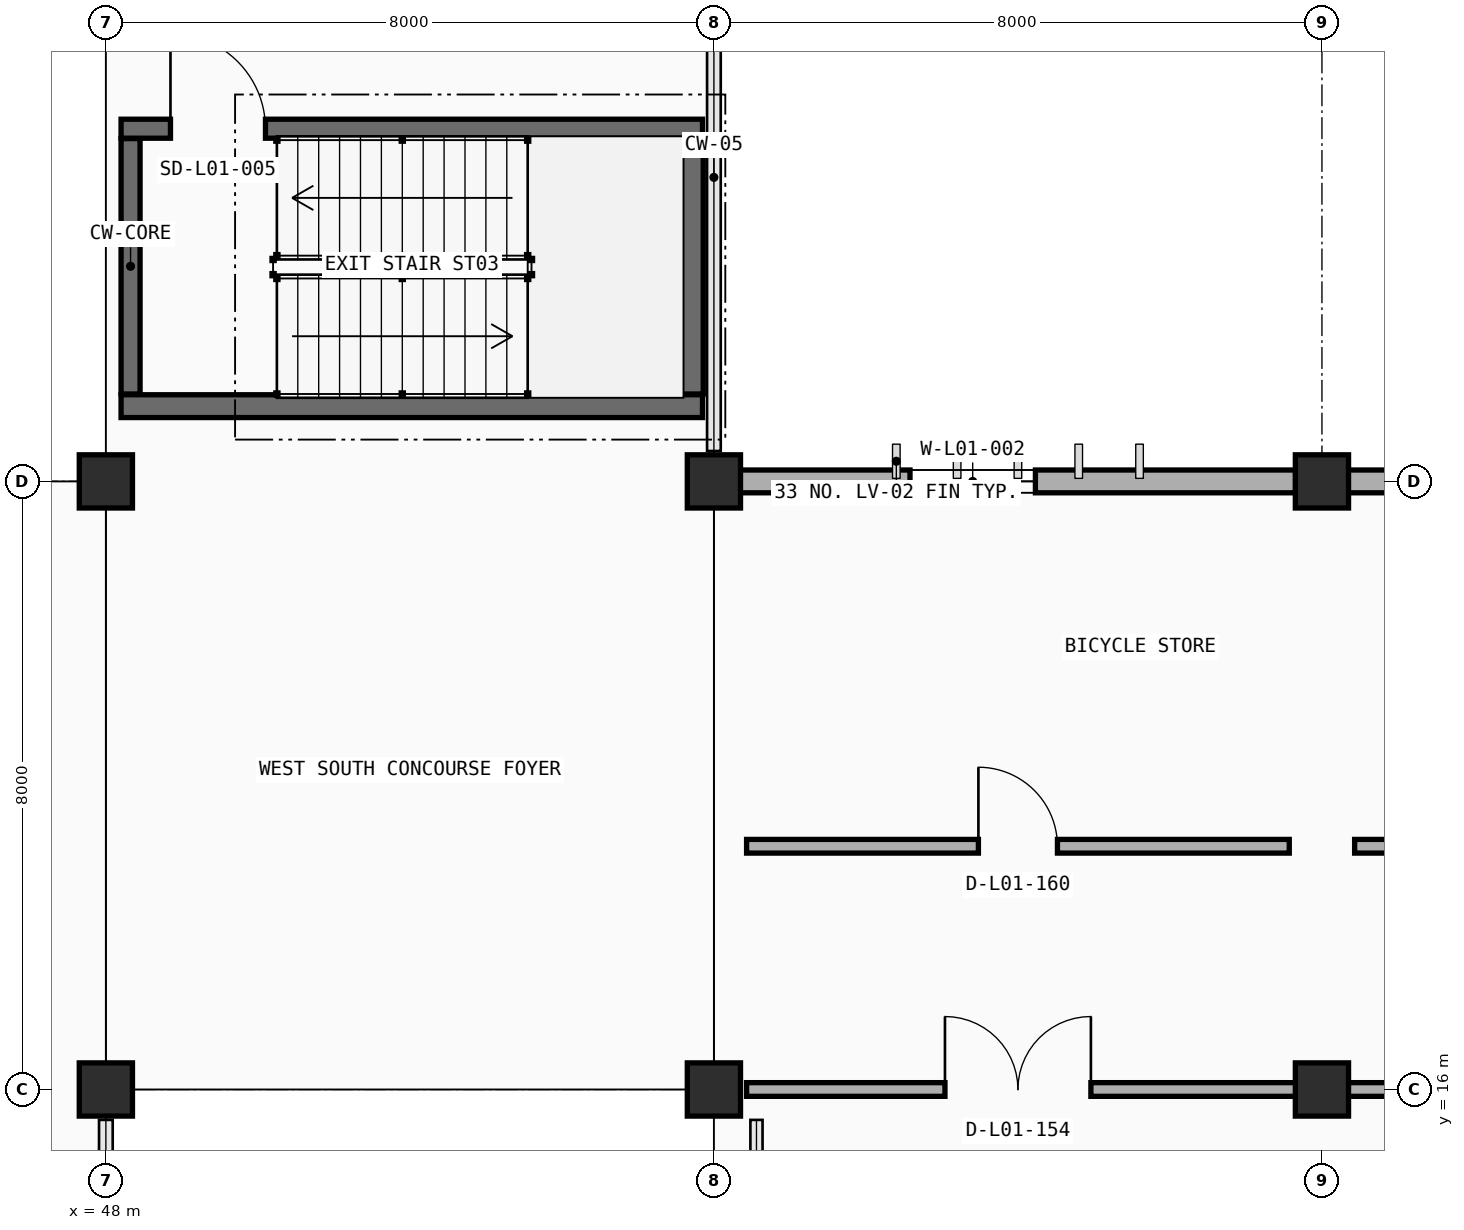
"""IFC4 building model, lengths in metres.
Left out: names, types, materials, properties, quantities, classifications, styles, units other than length and angle.
Written with IfcOpenShell. Run it as: python <this file> out.ifc"""

import sys

from ifc_helpers import new_model, si_unit, direction, frame, frame_2d, origin, origin_2d, place, context, subcontext, project, spatial, rectangle, extrude, element, fill, save


model = new_model("IFC4")
c1 = context("Model", 3, precision=1e-05, world=origin(), true_north=direction((0.0, 1.0)))
c2 = subcontext(c1, "Body", "Model", "MODEL_VIEW")
j1 = project(units=[si_unit("LENGTHUNIT", "METRE"), si_unit("PLANEANGLEUNIT", "RADIAN")], contexts=[c1])
p1 = place(None, origin())
s1 = spatial("IfcSite", under=j1, at=p1, CompositionType="ELEMENT")
p2 = place(p1, origin())
s2 = spatial("IfcBuilding", under=s1, at=p2, CompositionType="ELEMENT")
p3 = place(p2, origin())
s3 = spatial("IfcBuildingStorey", under=s2, at=p3, CompositionType="ELEMENT", Elevation=0.0)
for number, where, z_axis, x_axis in (
    (1, (48.0, 16.0, 0.0), (0.0, 0.0, 1.0), (1.0, 0.0, 0.0)),
    (2, (56.0, 16.0, 0.0), (0.0, 0.0, 1.0), (1.0, 0.0, 0.0)),
    (3, (64.0, 16.0, 0.0), (0.0, 0.0, 1.0), (1.0, 0.0, 0.0)),
    (4, (48.0, 24.0, 0.0), (0.0, 0.0, 1.0), (1.0, 0.0, 0.0)),
    (5, (56.0, 24.0, 0.0), (0.0, 0.0, 1.0), (1.0, 0.0, 0.0)),
    (6, (64.0, 24.0, 0.0), (0.0, 0.0, 1.0), (1.0, 0.0, 0.0)),
):
    element("IfcColumn", number, at=place(p3, frame(where, z_axis=z_axis, x_axis=x_axis)), inside=s3, PredefinedType="COLUMN", context=c2, shape_type="SweptSolid", body=[
        extrude(rectangle(XDim=0.7, YDim=0.7, at=origin_2d()), origin(), (0.0, 0.0, 1.0), 4.8),
    ])
p4 = place(p3, frame((56.347, 24.0, 0.0), z_axis=(0.0, 0.0, 1.0), x_axis=(1.0, 0.0, 0.0)))
e7 = element("IfcWall", 7, at=p4, inside=s3, PredefinedType="STANDARD", context=c2, shape_type="SweptSolid", body=[
    extrude(rectangle(XDim=7.306, YDim=0.3, at=frame_2d((3.653, 0.0))), origin(), (0.0, 0.0, 1.0), 3.91),
])
p5 = place(p4, frame((2.233, 0.0, 0.9)))
e8 = element("IfcOpeningElement", 8, at=p5, cuts=e7, PredefinedType="OPENING", context=c2, shape_type="SweptSolid", body=[
    extrude(rectangle(XDim=1.65, YDim=1.25, at=frame_2d((0.825, 0.625))), frame((0.0, 0.16, 0.0), z_axis=(0.0, -1.0, 0.0), x_axis=(1.0, 0.0, 0.0)), (0.0, 0.0, 1.0), 0.32),
])
p6 = place(p3, frame((64.347, 24.0, 0.0), z_axis=(0.0, 0.0, 1.0), x_axis=(1.0, 0.0, 0.0)))
e9 = element("IfcWall", 9, at=p6, inside=s3, PredefinedType="STANDARD", context=c2, shape_type="SweptSolid", body=[
    extrude(rectangle(XDim=7.306, YDim=0.3, at=frame_2d((3.653, 0.0))), origin(), (0.0, 0.0, 1.0), 3.91),
])
p7 = place(p6, frame((2.233, 0.0, 0.9)))
e10 = element("IfcOpeningElement", 10, at=p7, cuts=e9, PredefinedType="OPENING", context=c2, shape_type="SweptSolid", body=[
    extrude(rectangle(XDim=1.85, YDim=1.25, at=frame_2d((0.925, 0.625))), frame((0.0, 0.16, 0.0), z_axis=(0.0, -1.0, 0.0), x_axis=(1.0, 0.0, 0.0)), (0.0, 0.0, 1.0), 0.32),
])
p8 = place(p3, frame((56.24, 15.78, 0.0), z_axis=(0.0, 0.0, 1.0), x_axis=(1.0, 0.0, 0.0)))
e11 = element("IfcWall", 11, at=p8, inside=s3, PredefinedType="PARAPET", context=c2, shape_type="SweptSolid", body=[
    extrude(rectangle(XDim=0.32, YDim=0.2, at=frame_2d((0.16, 0.0))), origin(), (0.0, 0.0, 1.0), 3.95),
])
p9 = place(p3, frame((48.2, 24.99, 0.0), z_axis=(0.0, 0.0, 1.0), x_axis=(1.0, 0.0, 0.0)))
e12 = element("IfcWall", 12, at=p9, inside=s3, PredefinedType="SHEAR", context=c2, shape_type="SweptSolid", body=[
    extrude(rectangle(XDim=7.65, YDim=0.3, at=frame_2d((3.825, 0.0))), origin(), (0.0, 0.0, 1.0), 4.8),
])
p10 = place(p3, frame((55.71, 25.15, 0.0), z_axis=(0.0, 0.0, 1.0), x_axis=(0.0, 1.0, 0.0)))
e13 = element("IfcWall", 13, at=p10, inside=s3, PredefinedType="SHEAR", context=c2, shape_type="SweptSolid", body=[
    extrude(rectangle(XDim=3.36, YDim=0.3, at=frame_2d((1.68, 0.0))), origin(), (0.0, 0.0, 1.0), 4.8),
])
p11 = place(p3, frame((48.2, 28.64, 0.0), z_axis=(0.0, 0.0, 1.0), x_axis=(1.0, 0.0, 0.0)))
e14 = element("IfcWall", 14, at=p11, inside=s3, PredefinedType="SOLIDWALL", context=c2, shape_type="SweptSolid", body=[
    extrude(rectangle(XDim=7.65, YDim=0.25, at=frame_2d((3.825, 0.0))), origin(), (0.0, 0.0, 1.0), 4.8),
])
p12 = place(p11, frame((0.65, 0.0, 0.0)))
e15 = element("IfcOpeningElement", 15, at=p12, cuts=e14, PredefinedType="OPENING", context=c2, shape_type="SweptSolid", body=[
    extrude(rectangle(XDim=1.25, YDim=2.15, at=frame_2d((0.625, 1.075))), frame((0.0, 0.135, 0.0), z_axis=(0.0, -1.0, 0.0), x_axis=(1.0, 0.0, 0.0)), (0.0, 0.0, 1.0), 0.27),
])
p13 = place(p3, frame((48.325, 25.15, 0.0), z_axis=(0.0, 0.0, 1.0), x_axis=(0.0, 1.0, 0.0)))
e16 = element("IfcWall", 16, at=p13, inside=s3, PredefinedType="SOLIDWALL", context=c2, shape_type="SweptSolid", body=[
    extrude(rectangle(XDim=3.36, YDim=0.25, at=frame_2d((1.68, 0.0))), origin(), (0.0, 0.0, 1.0), 4.8),
])
p14 = place(p3, frame((56.43, 16.0, 0.0), z_axis=(0.0, 0.0, 1.0), x_axis=(1.0, 0.0, 0.0)))
e17 = element("IfcWall", 17, at=p14, inside=s3, PredefinedType="PARTITIONING", context=c2, shape_type="SweptSolid", body=[
    extrude(rectangle(XDim=15.14, YDim=0.18, at=frame_2d((7.57, 0.0))), origin(), (0.0, 0.0, 1.0), 3.81),
])
p15 = place(p14, frame((2.61, 0.0, 0.0)))
e18 = element("IfcOpeningElement", 18, at=p15, cuts=e17, PredefinedType="OPENING", context=c2, shape_type="SweptSolid", body=[
    extrude(rectangle(XDim=1.92, YDim=2.3, at=frame_2d((0.96, 1.15))), frame((0.0, 0.1, 0.0), z_axis=(0.0, -1.0, 0.0), x_axis=(1.0, 0.0, 0.0)), (0.0, 0.0, 1.0), 0.2),
])
p16 = place(p3, frame((56.43, 19.2, 0.0), z_axis=(0.0, 0.0, 1.0), x_axis=(1.0, 0.0, 0.0)))
e19 = element("IfcWall", 19, at=p16, inside=s3, PredefinedType="PARTITIONING", context=c2, shape_type="SweptSolid", body=[
    extrude(rectangle(XDim=7.14, YDim=0.18, at=frame_2d((3.57, 0.0))), origin(), (0.0, 0.0, 1.0), 3.9),
])
p17 = place(p16, frame((3.05, 0.0, 0.0)))
e20 = element("IfcOpeningElement", 20, at=p17, cuts=e19, PredefinedType="OPENING", context=c2, shape_type="SweptSolid", body=[
    extrude(rectangle(XDim=1.04, YDim=2.15, at=frame_2d((0.52, 1.075))), frame((0.0, 0.1, 0.0), z_axis=(0.0, -1.0, 0.0), x_axis=(1.0, 0.0, 0.0)), (0.0, 0.0, 1.0), 0.2),
])
p18 = place(p3, frame((64.43, 19.2, 0.0), z_axis=(0.0, 0.0, 1.0), x_axis=(1.0, 0.0, 0.0)))
e21 = element("IfcWall", 21, at=p18, inside=s3, PredefinedType="PARTITIONING", context=c2, shape_type="SweptSolid", body=[
    extrude(rectangle(XDim=15.14, YDim=0.18, at=frame_2d((7.57, 0.0))), origin(), (0.0, 0.0, 1.0), 3.9),
])
p19 = place(p18, frame((3.03, 0.0, 0.0)))
e22 = element("IfcOpeningElement", 22, at=p19, cuts=e21, PredefinedType="OPENING", context=c2, shape_type="SweptSolid", body=[
    extrude(rectangle(XDim=1.08, YDim=2.15, at=frame_2d((0.54, 1.075))), frame((0.0, 0.1, 0.0), z_axis=(0.0, -1.0, 0.0), x_axis=(1.0, 0.0, 0.0)), (0.0, 0.0, 1.0), 0.2),
])
p20 = place(p5, origin())
e23 = element("IfcWindow", 23, at=p20, inside=s3, PartitioningType="DOUBLE_PANEL_VERTICAL", PredefinedType="WINDOW", context=c2, shape_type="SweptSolid", body=[
    extrude(rectangle(XDim=1.65, YDim=1.25, at=frame_2d((0.825, 0.625))), frame((0.0, 0.03, 0.0), z_axis=(0.0, -1.0, 0.0), x_axis=(1.0, 0.0, 0.0)), (0.0, 0.0, 1.0), 0.06),
])
fill(e8, e23)
p21 = place(p12, origin())
e24 = element("IfcDoor", 24, at=p21, inside=s3, OperationType="SINGLE_SWING_LEFT", PredefinedType="DOOR", context=c2, shape_type="SweptSolid", body=[
    extrude(rectangle(XDim=1.25, YDim=2.15, at=frame_2d((0.625, 1.075))), frame((0.0, 0.025, 0.0), z_axis=(0.0, -1.0, 0.0), x_axis=(1.0, 0.0, 0.0)), (0.0, 0.0, 1.0), 0.05),
])
fill(e15, e24)
p22 = place(p15, origin())
e25 = element("IfcDoor", 25, at=p22, inside=s3, OperationType="DOUBLE_DOOR_SINGLE_SWING", PredefinedType="DOOR", context=c2, shape_type="SweptSolid", body=[
    extrude(rectangle(XDim=1.92, YDim=2.3, at=frame_2d((0.96, 1.15))), frame((0.0, 0.025, 0.0), z_axis=(0.0, -1.0, 0.0), x_axis=(1.0, 0.0, 0.0)), (0.0, 0.0, 1.0), 0.05),
])
fill(e18, e25)
p23 = place(p17, origin())
e26 = element("IfcDoor", 26, at=p23, inside=s3, OperationType="SINGLE_SWING_LEFT", PredefinedType="DOOR", context=c2, shape_type="SweptSolid", body=[
    extrude(rectangle(XDim=1.04, YDim=2.15, at=frame_2d((0.52, 1.075))), frame((0.0, 0.025, 0.0), z_axis=(0.0, -1.0, 0.0), x_axis=(1.0, 0.0, 0.0)), (0.0, 0.0, 1.0), 0.05),
])
fill(e20, e26)
save(model, sys.argv[1])
